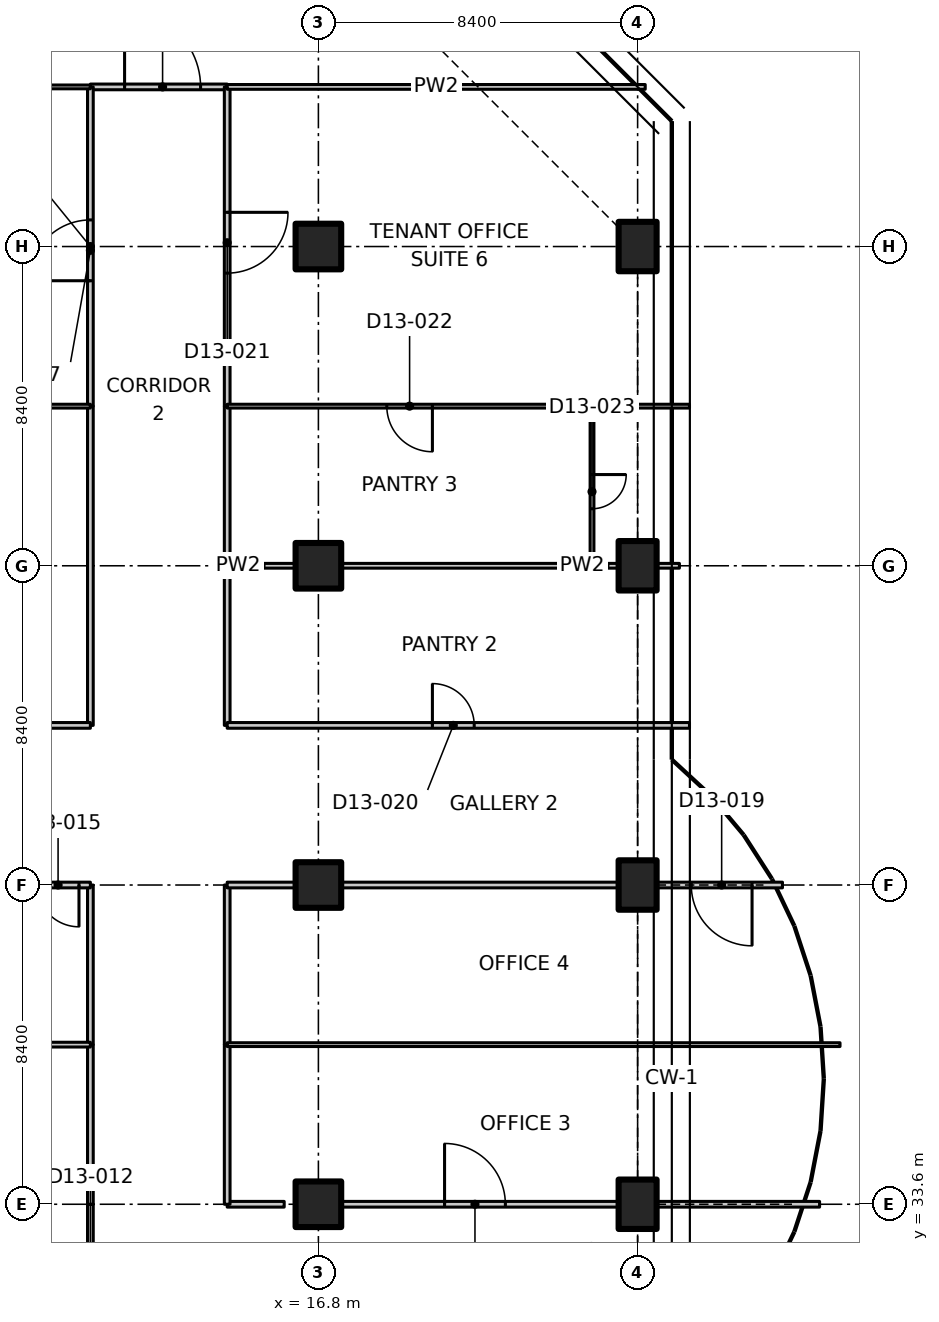
"""IFC4 building model, lengths in metres.
Left out: names, types, materials, properties, quantities, classifications, styles, units other than length and angle.
Written with IfcOpenShell. Run it as: python <this file> out.ifc"""

import sys

from ifc_helpers import new_model, si_unit, direction, frame, frame_2d, origin, origin_2d, place, context, subcontext, project, spatial, polyline, rectangle, outline, extrude, element, fill, save


model = new_model("IFC4")
c1 = context("Model", 3, precision=1e-05, world=origin(), true_north=direction((0.0, 1.0)))
c2 = subcontext(c1, "Body", "Model", "MODEL_VIEW")
j1 = project(units=[si_unit("LENGTHUNIT", "METRE"), si_unit("PLANEANGLEUNIT", "RADIAN")], contexts=[c1])
p1 = place(None, origin())
s1 = spatial("IfcSite", under=j1, at=p1, CompositionType="ELEMENT")
p2 = place(p1, origin())
s2 = spatial("IfcBuilding", under=s1, at=p2, CompositionType="ELEMENT")
p3 = place(p2, frame((0.0, 0.0, 98.9)))
s3 = spatial("IfcBuildingStorey", under=s2, at=p3, CompositionType="ELEMENT", Elevation=98.9)
for number, where, z_axis, x_axis in (
    (1, (16.8, 33.6, 0.0), (0.0, 0.0, 1.0), (1.0, 0.0, 0.0)),
    (2, (16.8, 42.0, 0.0), (0.0, 0.0, 1.0), (1.0, 0.0, 0.0)),
    (3, (16.8, 50.4, 0.0), (0.0, 0.0, 1.0), (1.0, 0.0, 0.0)),
    (4, (16.8, 58.8, 0.0), (0.0, 0.0, 1.0), (1.0, 0.0, 0.0)),
):
    element("IfcColumn", number, at=place(p3, frame(where, z_axis=z_axis, x_axis=x_axis)), inside=s3, PredefinedType="COLUMN", context=c2, shape_type="SweptSolid", body=[
        extrude(rectangle(XDim=1.2, YDim=1.2, at=origin_2d()), origin(), (0.0, 0.0, 1.0), 3.35),
    ])
for number, where, z_axis, x_axis in (
    (5, (25.2, 33.6, 0.0), (0.0, 0.0, 1.0), (1.0, 0.0, 0.0)),
    (6, (25.2, 42.0, 0.0), (0.0, 0.0, 1.0), (1.0, 0.0, 0.0)),
    (7, (25.2, 50.4, 0.0), (0.0, 0.0, 1.0), (1.0, 0.0, 0.0)),
    (8, (25.2, 58.8, 0.0), (0.0, 0.0, 1.0), (1.0, 0.0, 0.0)),
):
    element("IfcColumn", number, at=place(p3, frame(where, z_axis=z_axis, x_axis=x_axis)), inside=s3, PredefinedType="COLUMN", context=c2, shape_type="SweptSolid", body=[
        extrude(rectangle(XDim=1.0, YDim=1.3, at=origin_2d()), origin(), (0.0, 0.0, 1.0), 3.35),
    ])
p4 = place(p3, frame((10.8, 29.4, 0.0), z_axis=(0.0, 0.0, 1.0), x_axis=(0.0, 1.0, 0.0)))
e9 = element("IfcWall", 9, at=p4, inside=s3, PredefinedType="PARTITIONING", context=c2, shape_type="SweptSolid", body=[
    extrude(rectangle(XDim=4.2, YDim=0.15, at=frame_2d((2.1, 0.0))), origin(), (0.0, 0.0, 1.0), 3.33),
])
p5 = place(p4, frame((1.2, 0.0, 0.0)))
e10 = element("IfcOpeningElement", 10, at=p5, cuts=e9, PredefinedType="OPENING", context=c2, shape_type="SweptSolid", body=[
    extrude(rectangle(XDim=1.6, YDim=2.1, at=frame_2d((0.8, 1.05))), frame((0.0, 0.085, 0.0), z_axis=(0.0, -1.0, 0.0), x_axis=(1.0, 0.0, 0.0)), (0.0, 0.0, 1.0), 0.17),
])
p6 = place(p3, frame((14.4, 33.6, 0.0), z_axis=(0.0, 0.0, 1.0), x_axis=(1.0, 0.0, 0.0)))
e11 = element("IfcWall", 11, at=p6, inside=s3, PredefinedType="PARTITIONING", context=c2, shape_type="SweptSolid", body=[
    extrude(rectangle(XDim=1.5, YDim=0.15, at=frame_2d((0.75, 0.0))), origin(), (0.0, 0.0, 1.0), 3.33),
])
p7 = place(p3, frame((17.42, 33.6, 0.0), z_axis=(0.0, 0.0, 1.0), x_axis=(1.0, 0.0, 0.0)))
e12 = element("IfcWall", 12, at=p7, inside=s3, PredefinedType="PARTITIONING", context=c2, shape_type="SweptSolid", body=[
    extrude(rectangle(XDim=7.26, YDim=0.15, at=frame_2d((3.63, 0.0))), origin(), (0.0, 0.0, 1.0), 3.33),
])
p8 = place(p7, frame((2.7, 0.0, 0.0)))
e13 = element("IfcOpeningElement", 13, at=p8, cuts=e12, PredefinedType="OPENING", context=c2, shape_type="SweptSolid", body=[
    extrude(rectangle(XDim=1.6, YDim=2.1, at=frame_2d((0.8, 1.05))), frame((0.0, 0.085, 0.0), z_axis=(0.0, -1.0, 0.0), x_axis=(1.0, 0.0, 0.0)), (0.0, 0.0, 1.0), 0.17),
])
p9 = place(p3, frame((25.72, 33.6, 0.0), z_axis=(0.0, 0.0, 1.0), x_axis=(1.0, 0.0, 0.0)))
e14 = element("IfcWall", 14, at=p9, inside=s3, PredefinedType="PARTITIONING", context=c2, shape_type="SweptSolid", body=[
    extrude(rectangle(XDim=4.268, YDim=0.15, at=frame_2d((2.134, 0.0))), origin(), (0.0, 0.0, 1.0), 2.98),
])
p10 = place(p3, frame((10.8, 63.0, 0.0), z_axis=(0.0, 0.0, 1.0), x_axis=(1.0, 0.0, 0.0)))
e15 = element("IfcWall", 15, at=p10, inside=s3, PredefinedType="PARTITIONING", context=c2, shape_type="SweptSolid", body=[
    extrude(rectangle(XDim=3.6, YDim=0.15, at=frame_2d((1.8, 0.0))), origin(), (0.0, 0.0, 1.0), 3.33),
])
p11 = place(p10, frame((0.9, 0.0, 0.0)))
e16 = element("IfcOpeningElement", 16, at=p11, cuts=e15, PredefinedType="OPENING", context=c2, shape_type="SweptSolid", body=[
    extrude(rectangle(XDim=2.0, YDim=2.4, at=frame_2d((1.0, 1.2))), frame((0.0, 0.085, 0.0), z_axis=(0.0, -1.0, 0.0), x_axis=(1.0, 0.0, 0.0)), (0.0, 0.0, 1.0), 0.17),
])
for number, where, z_axis, x_axis in (
    (17, (10.8, 33.6, 0.0), (0.0, 0.0, 1.0), (0.0, 1.0, 0.0)),
    (18, (10.8, 37.8, 0.0), (0.0, 0.0, 1.0), (0.0, 1.0, 0.0)),
):
    element("IfcWall", number, at=place(p3, frame(where, z_axis=z_axis, x_axis=x_axis)), inside=s3, PredefinedType="PARTITIONING", context=c2, shape_type="SweptSolid", body=[
        extrude(rectangle(XDim=4.2, YDim=0.15, at=frame_2d((2.1, 0.0))), origin(), (0.0, 0.0, 1.0), 3.33),
    ])
p12 = place(p3, frame((10.8, 46.2, 0.0), z_axis=(0.0, 0.0, 1.0), x_axis=(0.0, 1.0, 0.0)))
e19 = element("IfcWall", 19, at=p12, inside=s3, PredefinedType="PARTITIONING", context=c2, shape_type="SweptSolid", body=[
    extrude(rectangle(XDim=8.4, YDim=0.15, at=frame_2d((4.2, 0.0))), origin(), (0.0, 0.0, 1.0), 3.33),
])
p13 = place(p3, frame((10.8, 54.6, 0.0), z_axis=(0.0, 0.0, 1.0), x_axis=(0.0, 1.0, 0.0)))
e20 = element("IfcWall", 20, at=p13, inside=s3, PredefinedType="PARTITIONING", context=c2, shape_type="SweptSolid", body=[
    extrude(rectangle(XDim=8.4, YDim=0.15, at=frame_2d((4.2, 0.0))), origin(), (0.0, 0.0, 1.0), 3.33),
])
p14 = place(p13, frame((3.3, 0.0, 0.0)))
e21 = element("IfcOpeningElement", 21, at=p14, cuts=e20, PredefinedType="OPENING", context=c2, shape_type="SweptSolid", body=[
    extrude(rectangle(XDim=1.6, YDim=2.1, at=frame_2d((0.8, 1.05))), frame((0.0, 0.085, 0.0), z_axis=(0.0, -1.0, 0.0), x_axis=(1.0, 0.0, 0.0)), (0.0, 0.0, 1.0), 0.17),
])
for number, where, z_axis, x_axis in (
    (22, (14.4, 37.8, 0.0), (0.0, 0.0, 1.0), (0.0, -1.0, 0.0)),
    (23, (14.4, 42.0, 0.0), (0.0, 0.0, 1.0), (0.0, -1.0, 0.0)),
    (24, (14.4, 50.4, 0.0), (0.0, 0.0, 1.0), (0.0, -1.0, 0.0)),
):
    element("IfcWall", number, at=place(p3, frame(where, z_axis=z_axis, x_axis=x_axis)), inside=s3, PredefinedType="PARTITIONING", context=c2, shape_type="SweptSolid", body=[
        extrude(rectangle(XDim=4.2, YDim=0.15, at=frame_2d((2.1, 0.0))), origin(), (0.0, 0.0, 1.0), 3.33),
    ])
p15 = place(p3, frame((14.4, 63.0, 0.0), z_axis=(0.0, 0.0, 1.0), x_axis=(0.0, -1.0, 0.0)))
e25 = element("IfcWall", 25, at=p15, inside=s3, PredefinedType="PARTITIONING", context=c2, shape_type="SweptSolid", body=[
    extrude(rectangle(XDim=8.4, YDim=0.15, at=frame_2d((4.2, 0.0))), origin(), (0.0, 0.0, 1.0), 3.33),
])
p16 = place(p15, frame((3.3, 0.0, 0.0)))
e26 = element("IfcOpeningElement", 26, at=p16, cuts=e25, PredefinedType="OPENING", context=c2, shape_type="SweptSolid", body=[
    extrude(rectangle(XDim=1.6, YDim=2.1, at=frame_2d((0.8, 1.05))), frame((0.0, 0.085, 0.0), z_axis=(0.0, -1.0, 0.0), x_axis=(1.0, 0.0, 0.0)), (0.0, 0.0, 1.0), 0.17),
])
p17 = place(p3, frame((14.4, 54.6, 0.0), z_axis=(0.0, 0.0, 1.0), x_axis=(0.0, -1.0, 0.0)))
e27 = element("IfcWall", 27, at=p17, inside=s3, PredefinedType="PARTITIONING", context=c2, shape_type="SweptSolid", body=[
    extrude(rectangle(XDim=4.2, YDim=0.15, at=frame_2d((2.1, 0.0))), origin(), (0.0, 0.0, 1.0), 3.33),
])
p18 = place(p3, frame((10.8, 63.0, 0.0), z_axis=(0.0, 0.0, 1.0), x_axis=(-1.0, 0.0, 0.0)))
e28 = element("IfcWall", 28, at=p18, inside=s3, PredefinedType="PARTITIONING", context=c2, shape_type="SweptSolid", body=[
    extrude(outline(polyline([(0.0, 0.0), (11.0, 0.0), (11.0, 3.33), (7.266, 3.33), (7.264, 2.98), (5.936, 2.98), (5.934, 3.33), (0.0, 3.33), (0.0, 0.0)])), frame((0.0, 0.05, 0.0), z_axis=(0.0, -1.0, 0.0), x_axis=(1.0, 0.0, 0.0)), (0.0, 0.0, 1.0), 0.1),
])
p19 = place(p3, frame((25.4, 63.0, 0.0), z_axis=(0.0, 0.0, 1.0), x_axis=(-1.0, 0.0, 0.0)))
e29 = element("IfcWall", 29, at=p19, inside=s3, PredefinedType="PARTITIONING", context=c2, shape_type="SweptSolid", body=[
    extrude(outline(polyline([(0.0, 0.0), (11.0, 0.0), (11.0, 3.33), (5.078, 3.33), (5.076, 2.98), (3.724, 2.98), (3.722, 3.33), (0.0, 3.33), (0.0, 0.0)])), frame((0.0, 0.062, 0.0), z_axis=(0.0, -1.0, 0.0), x_axis=(1.0, 0.0, 0.0)), (0.0, 0.0, 1.0), 0.125),
])
p20 = place(p3, frame((10.8, 42.0, 0.0), z_axis=(0.0, 0.0, 1.0), x_axis=(-1.0, 0.0, 0.0)))
e30 = element("IfcWall", 30, at=p20, inside=s3, PredefinedType="PARTITIONING", context=c2, shape_type="SweptSolid", body=[
    extrude(rectangle(XDim=1.78, YDim=0.15, at=frame_2d((0.89, 0.0))), origin(), (0.0, 0.0, 1.0), 3.33),
])
p21 = place(p20, frame((0.3, 0.0, 0.0)))
e31 = element("IfcOpeningElement", 31, at=p21, cuts=e30, PredefinedType="OPENING", context=c2, shape_type="SweptSolid", body=[
    extrude(rectangle(XDim=1.1, YDim=2.1, at=frame_2d((0.55, 1.05))), frame((0.0, 0.085, 0.0), z_axis=(0.0, -1.0, 0.0), x_axis=(1.0, 0.0, 0.0)), (0.0, 0.0, 1.0), 0.17),
])
p22 = place(p3, frame((-1.365, 46.2, 0.0), z_axis=(0.0, 0.0, 1.0), x_axis=(1.0, 0.0, 0.0)))
e32 = element("IfcWall", 32, at=p22, inside=s3, PredefinedType="PARTITIONING", context=c2, shape_type="SweptSolid", body=[
    extrude(outline(polyline([(0.0, 0.0), (12.165, 0.0), (12.165, 3.33), (1.815, 3.33), (1.813, 2.98), (0.917, 2.98), (0.915, 3.33), (0.265, 3.33), (0.0, 3.33), (0.0, 0.0)])), frame((0.0, 0.075, 0.0), z_axis=(0.0, -1.0, 0.0), x_axis=(1.0, 0.0, 0.0)), (0.0, 0.0, 1.0), 0.15),
])
p23 = place(p22, frame((5.565, 0.0, 0.0)))
e33 = element("IfcOpeningElement", 33, at=p23, cuts=e32, PredefinedType="OPENING", context=c2, shape_type="SweptSolid", body=[
    extrude(rectangle(XDim=1.6, YDim=2.1, at=frame_2d((0.8, 1.05))), frame((0.0, 0.085, 0.0), z_axis=(0.0, -1.0, 0.0), x_axis=(1.0, 0.0, 0.0)), (0.0, 0.0, 1.0), 0.17),
])
p24 = place(p3, frame((-1.365, 37.8, 0.0), z_axis=(0.0, 0.0, 1.0), x_axis=(1.0, 0.0, 0.0)))
e34 = element("IfcWall", 34, at=p24, inside=s3, PredefinedType="PARTITIONING", context=c2, shape_type="SweptSolid", body=[
    extrude(outline(polyline([(0.0, 0.0), (12.165, 0.0), (12.165, 3.33), (1.815, 3.33), (1.813, 2.98), (0.917, 2.98), (0.915, 3.33), (0.265, 3.33), (0.0, 3.33), (0.0, 0.0)])), frame((0.0, 0.062, 0.0), z_axis=(0.0, -1.0, 0.0), x_axis=(1.0, 0.0, 0.0)), (0.0, 0.0, 1.0), 0.125),
])
p25 = place(p3, frame((-1.365, 54.6, 0.0), z_axis=(0.0, 0.0, 1.0), x_axis=(1.0, 0.0, 0.0)))
e35 = element("IfcWall", 35, at=p25, inside=s3, PredefinedType="PARTITIONING", context=c2, shape_type="SweptSolid", body=[
    extrude(outline(polyline([(0.0, 0.0), (12.165, 0.0), (12.165, 3.33), (1.815, 3.33), (1.813, 2.98), (0.917, 2.98), (0.915, 3.33), (0.265, 3.33), (0.0, 3.33), (0.0, 0.0)])), frame((0.0, 0.05, 0.0), z_axis=(0.0, -1.0, 0.0), x_axis=(1.0, 0.0, 0.0)), (0.0, 0.0, 1.0), 0.1),
])
p26 = place(p3, frame((29.011, 42.0, 0.0), z_axis=(0.0, 0.0, 1.0), x_axis=(-1.0, 0.0, 0.0)))
e36 = element("IfcWall", 36, at=p26, inside=s3, PredefinedType="PARTITIONING", context=c2, shape_type="SweptSolid", body=[
    extrude(rectangle(XDim=3.292, YDim=0.15, at=frame_2d((1.646, 0.0))), origin(), (0.0, 0.0, 1.0), 2.98),
])
p27 = place(p26, frame((0.8, 0.0, 0.0)))
e37 = element("IfcOpeningElement", 37, at=p27, cuts=e36, PredefinedType="OPENING", context=c2, shape_type="SweptSolid", body=[
    extrude(rectangle(XDim=1.6, YDim=2.1, at=frame_2d((0.8, 1.05))), frame((0.0, 0.085, 0.0), z_axis=(0.0, -1.0, 0.0), x_axis=(1.0, 0.0, 0.0)), (0.0, 0.0, 1.0), 0.17),
])
p28 = place(p3, frame((24.68, 42.0, 0.0), z_axis=(0.0, 0.0, 1.0), x_axis=(-1.0, 0.0, 0.0)))
e38 = element("IfcWall", 38, at=p28, inside=s3, PredefinedType="PARTITIONING", context=c2, shape_type="SweptSolid", body=[
    extrude(rectangle(XDim=7.26, YDim=0.15, at=frame_2d((3.63, 0.0))), origin(), (0.0, 0.0, 1.0), 3.33),
])
p29 = place(p3, frame((16.18, 42.0, 0.0), z_axis=(0.0, 0.0, 1.0), x_axis=(-1.0, 0.0, 0.0)))
e39 = element("IfcWall", 39, at=p29, inside=s3, PredefinedType="PARTITIONING", context=c2, shape_type="SweptSolid", body=[
    extrude(rectangle(XDim=1.78, YDim=0.15, at=frame_2d((0.89, 0.0))), origin(), (0.0, 0.0, 1.0), 3.33),
])
p30 = place(p3, frame((14.4, 46.2, 0.0), z_axis=(0.0, 0.0, 1.0), x_axis=(1.0, 0.0, 0.0)))
e40 = element("IfcWall", 40, at=p30, inside=s3, PredefinedType="PARTITIONING", context=c2, shape_type="SweptSolid", body=[
    extrude(outline(polyline([(0.0, 0.0), (12.165, 0.0), (12.165, 3.33), (11.9, 3.33), (11.25, 3.33), (11.248, 2.98), (10.352, 2.98), (10.35, 3.33), (0.0, 3.33), (0.0, 0.0)])), frame((0.0, 0.075, 0.0), z_axis=(0.0, -1.0, 0.0), x_axis=(1.0, 0.0, 0.0)), (0.0, 0.0, 1.0), 0.15),
])
p31 = place(p30, frame((5.4, 0.0, 0.0)))
e41 = element("IfcOpeningElement", 41, at=p31, cuts=e40, PredefinedType="OPENING", context=c2, shape_type="SweptSolid", body=[
    extrude(rectangle(XDim=1.1, YDim=2.1, at=frame_2d((0.55, 1.05))), frame((0.0, 0.085, 0.0), z_axis=(0.0, -1.0, 0.0), x_axis=(1.0, 0.0, 0.0)), (0.0, 0.0, 1.0), 0.17),
])
p32 = place(p3, frame((14.4, 37.8, 0.0), z_axis=(0.0, 0.0, 1.0), x_axis=(1.0, 0.0, 0.0)))
e42 = element("IfcWall", 42, at=p32, inside=s3, PredefinedType="PARTITIONING", context=c2, shape_type="SweptSolid", body=[
    extrude(outline(polyline([(0.0, 0.0), (16.126, 0.0), (16.126, 3.33), (15.843, 3.33), (11.25, 3.33), (11.248, 2.98), (10.352, 2.98), (10.35, 3.33), (0.0, 3.33), (0.0, 0.0)])), frame((0.0, 0.05, 0.0), z_axis=(0.0, -1.0, 0.0), x_axis=(1.0, 0.0, 0.0)), (0.0, 0.0, 1.0), 0.1),
])
p33 = place(p3, frame((14.4, 50.4, 0.0), z_axis=(0.0, 0.0, 1.0), x_axis=(1.0, 0.0, 0.0)))
e43 = element("IfcWall", 43, at=p33, inside=s3, PredefinedType="PARTITIONING", context=c2, shape_type="SweptSolid", body=[
    extrude(rectangle(XDim=1.78, YDim=0.125, at=frame_2d((0.89, 0.0))), origin(), (0.0, 0.0, 1.0), 3.33),
])
p34 = place(p3, frame((17.42, 50.4, 0.0), z_axis=(0.0, 0.0, 1.0), x_axis=(1.0, 0.0, 0.0)))
e44 = element("IfcWall", 44, at=p34, inside=s3, PredefinedType="PARTITIONING", context=c2, shape_type="SweptSolid", body=[
    extrude(rectangle(XDim=6.58, YDim=0.125, at=frame_2d((3.29, 0.0))), origin(), (0.0, 0.0, 1.0), 3.33),
])
p35 = place(p3, frame((24.0, 50.4, 0.0), z_axis=(0.0, 0.0, 1.0), x_axis=(1.0, 0.0, 0.0)))
e45 = element("IfcWall", 45, at=p35, inside=s3, PredefinedType="PARTITIONING", context=c2, shape_type="SweptSolid", body=[
    extrude(rectangle(XDim=0.68, YDim=0.125, at=frame_2d((0.34, 0.0))), origin(), (0.0, 0.0, 1.0), 3.33),
])
p36 = place(p3, frame((25.72, 50.4, 0.0), z_axis=(0.0, 0.0, 1.0), x_axis=(1.0, 0.0, 0.0)))
e46 = element("IfcWall", 46, at=p36, inside=s3, PredefinedType="PARTITIONING", context=c2, shape_type="SweptSolid", body=[
    extrude(rectangle(XDim=0.58, YDim=0.125, at=frame_2d((0.29, 0.0))), origin(), (0.0, 0.0, 1.0), 3.33),
])
p37 = place(p3, frame((24.0, 54.6, 0.0), z_axis=(0.0, 0.0, 1.0), x_axis=(-1.0, 0.0, 0.0)))
e47 = element("IfcWall", 47, at=p37, inside=s3, PredefinedType="PARTITIONING", context=c2, shape_type="SweptSolid", body=[
    extrude(rectangle(XDim=9.6, YDim=0.1, at=frame_2d((4.8, 0.0))), origin(), (0.0, 0.0, 1.0), 3.33),
])
p38 = place(p37, frame((4.2, 0.0, 0.0)))
e48 = element("IfcOpeningElement", 48, at=p38, cuts=e47, PredefinedType="OPENING", context=c2, shape_type="SweptSolid", body=[
    extrude(rectangle(XDim=1.2, YDim=2.1, at=frame_2d((0.6, 1.05))), frame((0.0, 0.06, 0.0), z_axis=(0.0, -1.0, 0.0), x_axis=(1.0, 0.0, 0.0)), (0.0, 0.0, 1.0), 0.12),
])
p39 = place(p3, frame((26.565, 54.6, 0.0), z_axis=(0.0, 0.0, 1.0), x_axis=(-1.0, 0.0, 0.0)))
e49 = element("IfcWall", 49, at=p39, inside=s3, PredefinedType="PARTITIONING", context=c2, shape_type="SweptSolid", body=[
    extrude(rectangle(XDim=2.565, YDim=0.1, at=frame_2d((1.282, 0.0))), origin(), (0.0, 0.0, 1.0), 2.98),
])
p40 = place(p3, frame((24.0, 54.6, 0.0), z_axis=(0.0, 0.0, 1.0), x_axis=(0.0, -1.0, 0.0)))
e50 = element("IfcWall", 50, at=p40, inside=s3, PredefinedType="PARTITIONING", context=c2, shape_type="SweptSolid", body=[
    extrude(rectangle(XDim=4.2, YDim=0.1, at=frame_2d((2.1, 0.0))), origin(), (0.0, 0.0, 1.0), 3.33),
])
p41 = place(p40, frame((1.8, 0.0, 0.0)))
e51 = element("IfcOpeningElement", 51, at=p41, cuts=e50, PredefinedType="OPENING", context=c2, shape_type="SweptSolid", body=[
    extrude(rectangle(XDim=0.9, YDim=2.1, at=frame_2d((0.45, 1.05))), frame((0.0, 0.06, 0.0), z_axis=(0.0, -1.0, 0.0), x_axis=(1.0, 0.0, 0.0)), (0.0, 0.0, 1.0), 0.12),
])
p42 = place(p11, origin())
e52 = element("IfcDoor", 52, at=p42, inside=s3, OperationType="DOUBLE_DOOR_SINGLE_SWING", PredefinedType="DOOR", context=c2, shape_type="SweptSolid", body=[
    extrude(rectangle(XDim=2.0, YDim=2.4, at=frame_2d((1.0, 1.2))), frame((0.0, 0.025, 0.0), z_axis=(0.0, -1.0, 0.0), x_axis=(1.0, 0.0, 0.0)), (0.0, 0.0, 1.0), 0.05),
])
fill(e16, e52)
p43 = place(p21, origin())
e53 = element("IfcDoor", 53, at=p43, inside=s3, OperationType="SINGLE_SWING_LEFT", PredefinedType="DOOR", context=c2, shape_type="SweptSolid", body=[
    extrude(rectangle(XDim=1.1, YDim=2.1, at=frame_2d((0.55, 1.05))), frame((0.0, 0.025, 0.0), z_axis=(0.0, -1.0, 0.0), x_axis=(1.0, 0.0, 0.0)), (0.0, 0.0, 1.0), 0.05),
])
fill(e31, e53)
p44 = place(p14, origin())
e54 = element("IfcDoor", 54, at=p44, inside=s3, OperationType="DOUBLE_DOOR_SINGLE_SWING", PredefinedType="DOOR", context=c2, shape_type="SweptSolid", body=[
    extrude(rectangle(XDim=1.6, YDim=2.1, at=frame_2d((0.8, 1.05))), frame((0.0, 0.025, 0.0), z_axis=(0.0, -1.0, 0.0), x_axis=(1.0, 0.0, 0.0)), (0.0, 0.0, 1.0), 0.05),
])
fill(e21, e54)
p45 = place(p8, origin())
e55 = element("IfcDoor", 55, at=p45, inside=s3, OperationType="DOUBLE_DOOR_SINGLE_SWING", PredefinedType="DOOR", context=c2, shape_type="SweptSolid", body=[
    extrude(rectangle(XDim=1.6, YDim=2.1, at=frame_2d((0.8, 1.05))), frame((0.0, 0.025, 0.0), z_axis=(0.0, -1.0, 0.0), x_axis=(1.0, 0.0, 0.0)), (0.0, 0.0, 1.0), 0.05),
])
fill(e13, e55)
p46 = place(p27, origin())
e56 = element("IfcDoor", 56, at=p46, inside=s3, OperationType="DOUBLE_DOOR_SINGLE_SWING", PredefinedType="DOOR", context=c2, shape_type="SweptSolid", body=[
    extrude(rectangle(XDim=1.6, YDim=2.1, at=frame_2d((0.8, 1.05))), frame((0.0, 0.025, 0.0), z_axis=(0.0, -1.0, 0.0), x_axis=(1.0, 0.0, 0.0)), (0.0, 0.0, 1.0), 0.05),
])
fill(e37, e56)
p47 = place(p31, origin())
e57 = element("IfcDoor", 57, at=p47, inside=s3, OperationType="SINGLE_SWING_LEFT", PredefinedType="DOOR", context=c2, shape_type="SweptSolid", body=[
    extrude(rectangle(XDim=1.1, YDim=2.1, at=frame_2d((0.55, 1.05))), frame((0.0, 0.025, 0.0), z_axis=(0.0, -1.0, 0.0), x_axis=(1.0, 0.0, 0.0)), (0.0, 0.0, 1.0), 0.05),
])
fill(e41, e57)
p48 = place(p16, origin())
e58 = element("IfcDoor", 58, at=p48, inside=s3, OperationType="DOUBLE_DOOR_SINGLE_SWING", PredefinedType="DOOR", context=c2, shape_type="SweptSolid", body=[
    extrude(rectangle(XDim=1.6, YDim=2.1, at=frame_2d((0.8, 1.05))), frame((0.0, 0.025, 0.0), z_axis=(0.0, -1.0, 0.0), x_axis=(1.0, 0.0, 0.0)), (0.0, 0.0, 1.0), 0.05),
])
fill(e26, e58)
p49 = place(p38, origin())
e59 = element("IfcDoor", 59, at=p49, inside=s3, OperationType="SINGLE_SWING_LEFT", PredefinedType="DOOR", context=c2, shape_type="SweptSolid", body=[
    extrude(rectangle(XDim=1.2, YDim=2.1, at=frame_2d((0.6, 1.05))), frame((0.0, 0.025, 0.0), z_axis=(0.0, -1.0, 0.0), x_axis=(1.0, 0.0, 0.0)), (0.0, 0.0, 1.0), 0.05),
])
fill(e48, e59)
p50 = place(p41, origin())
e60 = element("IfcDoor", 60, at=p50, inside=s3, OperationType="SINGLE_SWING_LEFT", PredefinedType="DOOR", context=c2, shape_type="SweptSolid", body=[
    extrude(rectangle(XDim=0.9, YDim=2.1, at=frame_2d((0.45, 1.05))), frame((0.0, 0.025, 0.0), z_axis=(0.0, -1.0, 0.0), x_axis=(1.0, 0.0, 0.0)), (0.0, 0.0, 1.0), 0.05),
])
fill(e51, e60)
save(model, sys.argv[1])
